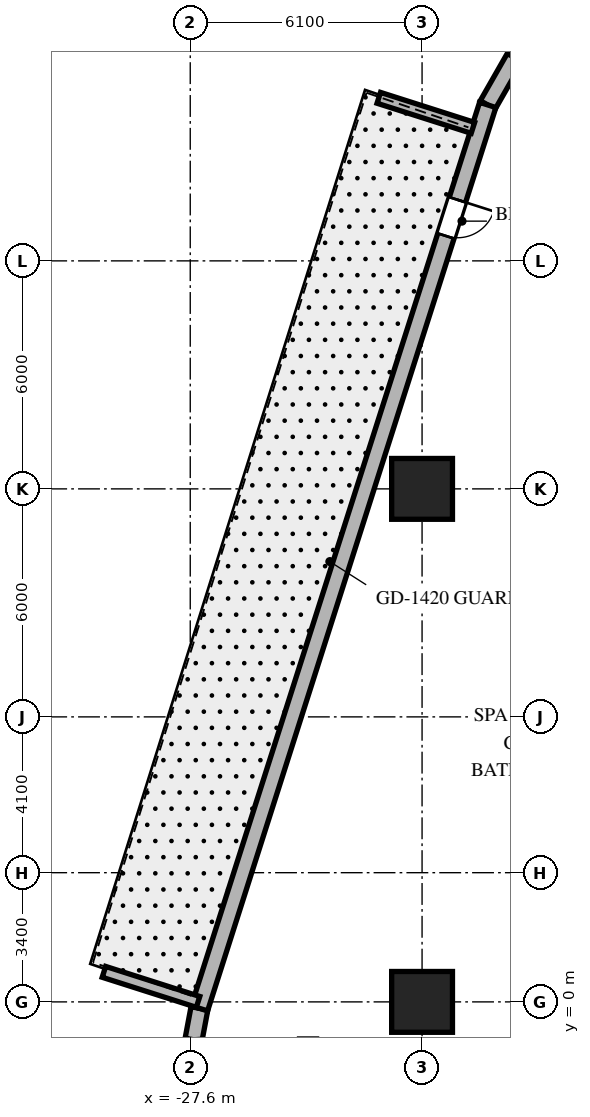
"""IFC4 building model, lengths in metres.
Left out: names, types, materials, properties, quantities, classifications, styles, units other than length and angle.
Written with IfcOpenShell. Run it as: python <this file> out.ifc"""

import sys

from ifc_helpers import new_model, si_unit, direction, frame, frame_2d, origin, origin_2d, place, context, subcontext, project, spatial, rectangle, extrude, element, fill, save


model = new_model("IFC4")
c1 = context("Model", 3, precision=1e-05, world=origin(), true_north=direction((0.0, 1.0)))
c2 = subcontext(c1, "Body", "Model", "MODEL_VIEW")
j1 = project(units=[si_unit("LENGTHUNIT", "METRE"), si_unit("PLANEANGLEUNIT", "RADIAN")], contexts=[c1])
p1 = place(None, origin())
s1 = spatial("IfcSite", under=j1, at=p1, CompositionType="ELEMENT")
p2 = place(p1, origin())
s2 = spatial("IfcBuilding", under=s1, at=p2, CompositionType="ELEMENT")
p3 = place(p2, frame((0.0, 0.0, 23.4)))
s3 = spatial("IfcBuildingStorey", under=s2, at=p3, CompositionType="ELEMENT", Elevation=23.4)
for number, where, z_axis, x_axis in (
    (1, (-21.5, 0.0, 0.0), (0.0, 0.0, 1.0), (1.0, 0.0, 0.0)),
    (2, (-21.5, 13.5, 0.0), (0.0, 0.0, 1.0), (1.0, 0.0, 0.0)),
):
    element("IfcColumn", number, at=place(p3, frame(where, z_axis=z_axis, x_axis=x_axis)), inside=s3, PredefinedType="COLUMN", context=c2, shape_type="SweptSolid", body=[
        extrude(rectangle(XDim=1.6, YDim=1.6, at=origin_2d()), origin(), (0.0, 0.0, 1.0), 4.8),
    ])
p4 = place(p3, frame((-17.926, 25.676, 0.0), z_axis=(0.0, 0.0, 1.0), x_axis=(-0.80747376574, -0.589903481632, 0.0)))
e3 = element("IfcWall", 3, at=p4, inside=s3, PredefinedType="SOLIDWALL", context=c2, shape_type="SweptSolid", body=[
    extrude(rectangle(XDim=1.407, YDim=0.45, at=frame_2d((0.704, 0.0))), origin(), (0.0, 0.0, 1.0), 4.48),
])
p5 = place(p3, frame((-19.062, 24.846, 0.0), z_axis=(0.0, 0.0, 1.0), x_axis=(-0.496194045245, -0.868211650154, 0.0)))
e4 = element("IfcWall", 4, at=p5, inside=s3, PredefinedType="SOLIDWALL", context=c2, shape_type="SweptSolid", body=[
    extrude(rectangle(XDim=1.431, YDim=0.45, at=frame_2d((0.716, 0.0))), origin(), (0.0, 0.0, 1.0), 4.48),
])
p6 = place(p3, frame((-27.358, -0.169, 0.0), z_axis=(0.0, 0.0, 1.0), x_axis=(-0.184673610867, -0.982799907127, 0.0)))
e5 = element("IfcWall", 5, at=p6, inside=s3, PredefinedType="SOLIDWALL", context=c2, shape_type="SweptSolid", body=[
    extrude(rectangle(XDim=0.842, YDim=0.45, at=frame_2d((0.421, 0.0))), origin(), (0.0, 0.0, 1.0), 4.48),
])
p7 = place(p3, frame((-19.772, 23.604, 0.0), z_axis=(0.0, 0.0, 1.0), x_axis=(-0.303982551741, -0.952677599315, 0.0)))
e6 = element("IfcWall", 6, at=p7, inside=s3, PredefinedType="SOLIDWALL", context=c2, shape_type="SweptSolid", body=[
    extrude(rectangle(XDim=24.954, YDim=0.45, at=frame_2d((12.477, 0.0))), origin(), (0.0, 0.0, 1.0), 4.48),
])
p8 = place(p7, frame((2.619, 0.0, 0.0)))
e7 = element("IfcOpeningElement", 7, at=p8, cuts=e6, PredefinedType="OPENING", context=c2, shape_type="SweptSolid", body=[
    extrude(rectangle(XDim=1.0, YDim=2.15, at=frame_2d((0.5, 1.075))), frame((0.0, 0.235, 0.0), z_axis=(0.0, -1.0, 0.0), x_axis=(1.0, 0.0, 0.0)), (0.0, 0.0, 1.0), 0.47),
])
p9 = place(p3, frame((-20.162, 23.0, 0.0), z_axis=(0.0, 0.0, 1.0), x_axis=(-0.952688718621, 0.303947701772, 0.0)))
e8 = element("IfcWall", 8, at=p9, inside=s3, PredefinedType="PARAPET", context=c2, shape_type="SweptSolid", body=[
    extrude(rectangle(XDim=2.6, YDim=0.3, at=frame_2d((1.3, 0.0))), origin(), (0.0, 0.0, 1.0), 1.15),
])
p10 = place(p3, frame((-27.394, 0.0, 0.0), z_axis=(0.0, 0.0, 1.0), x_axis=(-0.952680042768, 0.303974893883, 0.0)))
e9 = element("IfcWall", 9, at=p10, inside=s3, PredefinedType="PARAPET", context=c2, shape_type="SweptSolid", body=[
    extrude(rectangle(XDim=2.6, YDim=0.3, at=frame_2d((1.3, 0.0))), origin(), (0.0, 0.0, 1.0), 1.15),
])
p11 = place(p8, origin())
e10 = element("IfcDoor", 10, at=p11, inside=s3, OperationType="SINGLE_SWING_LEFT", PredefinedType="DOOR", context=c2, shape_type="SweptSolid", body=[
    extrude(rectangle(XDim=1.0, YDim=2.15, at=frame_2d((0.5, 1.075))), frame((0.0, 0.025, 0.0), z_axis=(0.0, -1.0, 0.0), x_axis=(1.0, 0.0, 0.0)), (0.0, 0.0, 1.0), 0.05),
])
fill(e7, e10)
save(model, sys.argv[1])
